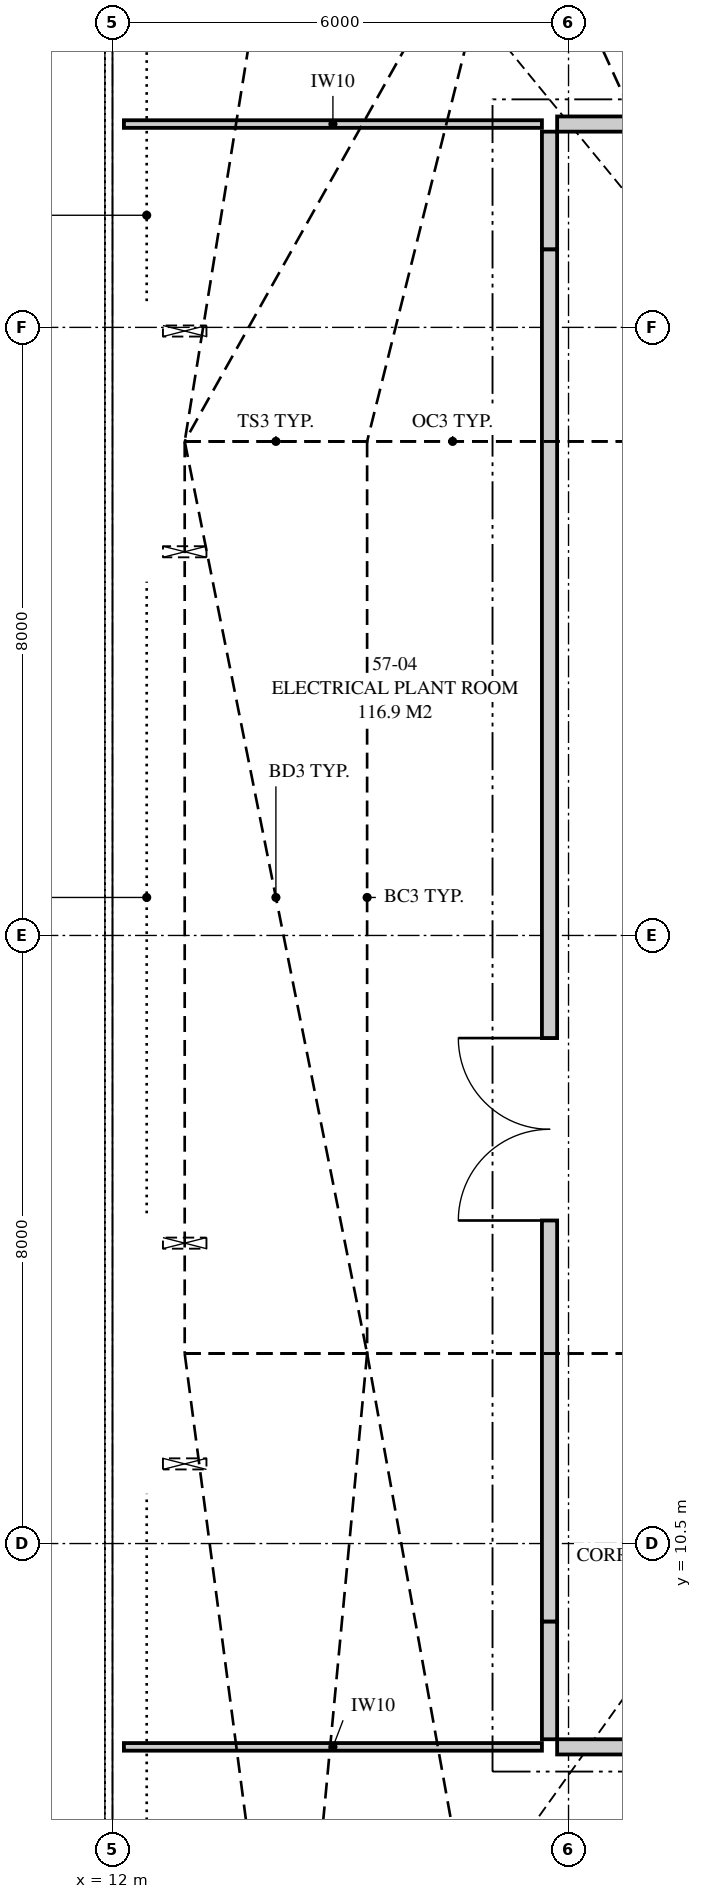
"""IFC4 building model, lengths in metres.
Left out: names, types, materials, properties, quantities, classifications, styles, units other than length and angle.
Written with IfcOpenShell. Run it as: python <this file> out.ifc"""

import sys

from ifc_helpers import new_model, si_unit, direction, frame, frame_2d, origin, place, context, subcontext, project, spatial, polyline, rectangle, outline, extrude, element, fill, save


model = new_model("IFC4")
c1 = context("Model", 3, precision=1e-05, world=origin(), true_north=direction((0.0, 1.0)))
c2 = subcontext(c1, "Body", "Model", "MODEL_VIEW")
j1 = project(units=[si_unit("LENGTHUNIT", "METRE"), si_unit("PLANEANGLEUNIT", "RADIAN")], contexts=[c1])
p1 = place(None, origin())
s1 = spatial("IfcSite", under=j1, at=p1, CompositionType="ELEMENT")
p2 = place(p1, origin())
s2 = spatial("IfcBuilding", under=s1, at=p2, CompositionType="ELEMENT")
p3 = place(p2, frame((0.0, 0.0, 207.95)))
s3 = spatial("IfcBuildingStorey", under=s2, at=p3, CompositionType="ELEMENT", Elevation=207.95)
p4 = place(p3, frame((17.85, 7.825, 0.0), z_axis=(0.0, 0.0, 1.0), x_axis=(1.0, 0.0, 0.0)))
e1 = element("IfcWall", 1, at=p4, inside=s3, PredefinedType="PARTITIONING", context=c2, shape_type="SweptSolid", body=[
    extrude(outline(polyline([(28.1, 1.2), (28.1, 4.72), (24.046, 4.72), (24.046, 4.141), (23.199, 4.141), (23.199, 4.72), (20.797, 4.72), (20.797, 4.141), (19.951, 4.141), (19.951, 4.72), (17.281, 4.72), (17.281, 4.245), (16.769, 4.245), (16.769, 4.72), (15.675, 4.72), (15.675, 4.141), (14.708, 4.141), (14.708, 4.72), (10.886, 4.72), (10.886, 4.141), (10.042, 4.141), (10.042, 4.72), (5.956, 4.72), (5.956, 4.141), (5.037, 4.141), (5.037, 4.72), (3.758, 4.72), (3.758, 4.141), (3.117, 4.141), (3.117, 4.72), (1.606, 4.72), (1.606, 4.141), (1.038, 4.141), (1.038, 4.72), (0.0, 4.72), (0.0, 1.2), (1.102, 1.2), (1.102, 0.0), (27.304, 0.0), (27.304, 1.2), (28.1, 1.2)]), holes=[polyline([(16.179, 3.43), (16.686, 3.496), (16.686, 3.004), (16.632, 2.889), (16.125, 2.824), (16.125, 3.316), (16.179, 3.43)])]), frame((0.0, 0.1, 0.0), z_axis=(0.0, -1.0, 0.0), x_axis=(1.0, 0.0, 0.0)), (0.0, 0.0, 1.0), 0.2),
])
p5 = place(p4, frame((1.325, 0.0, 0.0)))
e2 = element("IfcOpeningElement", 2, at=p5, cuts=e1, PredefinedType="OPENING", context=c2, shape_type="SweptSolid", body=[
    extrude(rectangle(XDim=1.0, YDim=2.1, at=frame_2d((0.5, 1.05))), frame((0.0, 0.11, 0.0), z_axis=(0.0, -1.0, 0.0), x_axis=(1.0, 0.0, 0.0)), (0.0, 0.0, 1.0), 0.22),
])
p6 = place(p4, frame((26.1, 0.0, 0.0)))
e3 = element("IfcOpeningElement", 3, at=p6, cuts=e1, PredefinedType="OPENING", context=c2, shape_type="SweptSolid", body=[
    extrude(rectangle(XDim=1.0, YDim=2.1, at=frame_2d((0.5, 1.05))), frame((0.0, 0.11, 0.0), z_axis=(0.0, -1.0, 0.0), x_axis=(1.0, 0.0, 0.0)), (0.0, 0.0, 1.0), 0.22),
])
p7 = place(p3, frame((17.75, 7.925, 0.0), z_axis=(0.0, 0.0, 1.0), x_axis=(0.0, 1.0, 0.0)))
e4 = element("IfcWall", 4, at=p7, inside=s3, PredefinedType="PARTITIONING", context=c2, shape_type="SweptSolid", body=[
    extrude(outline(polyline([(1.55, 4.72), (0.0, 4.72), (0.0, 1.2), (0.178, 1.2), (0.178, 0.0), (1.55, 0.0), (1.55, 4.72)])), frame((0.0, 0.1, 0.0), z_axis=(0.0, -1.0, 0.0), x_axis=(1.0, 0.0, 0.0)), (0.0, 0.0, 1.0), 0.2),
])
p8 = place(p3, frame((17.85, 29.175, 0.0), z_axis=(0.0, 0.0, 1.0), x_axis=(1.0, 0.0, 0.0)))
e5 = element("IfcWall", 5, at=p8, inside=s3, PredefinedType="PARTITIONING", context=c2, shape_type="SweptSolid", body=[
    extrude(outline(polyline([(28.1, 1.2), (28.1, 4.72), (23.48, 4.72), (23.48, 4.141), (22.49, 4.141), (22.49, 4.72), (21.506, 4.72), (21.506, 4.141), (20.516, 4.141), (20.516, 4.72), (17.281, 4.72), (17.281, 4.245), (16.769, 4.245), (16.769, 4.72), (13.232, 4.72), (13.232, 4.141), (12.437, 4.141), (12.437, 4.72), (11.948, 4.72), (11.948, 4.141), (11.126, 4.141), (11.126, 4.72), (4.143, 4.72), (4.143, 4.141), (2.733, 4.141), (2.733, 4.72), (1.35, 4.72), (1.35, 4.141), (0.74, 4.141), (0.74, 4.72), (0.0, 4.72), (0.0, 1.2), (0.892, 1.2), (0.892, 0.0), (27.554, 0.0), (27.554, 1.2), (28.1, 1.2)]), holes=[polyline([(16.106, 3.278), (16.617, 3.359), (16.617, 2.855), (16.556, 2.728), (16.045, 2.646), (16.045, 3.15), (16.106, 3.278)])]), frame((0.0, 0.1, 0.0), z_axis=(0.0, -1.0, 0.0), x_axis=(1.0, 0.0, 0.0)), (0.0, 0.0, 1.0), 0.2),
])
p9 = place(p8, frame((12.8, 0.0, 0.0)))
e6 = element("IfcOpeningElement", 6, at=p9, cuts=e5, PredefinedType="OPENING", context=c2, shape_type="SweptSolid", body=[
    extrude(rectangle(XDim=2.4, YDim=2.4, at=frame_2d((1.2, 1.2))), frame((0.0, 0.11, 0.0), z_axis=(0.0, -1.0, 0.0), x_axis=(1.0, 0.0, 0.0)), (0.0, 0.0, 1.0), 0.22),
])
p10 = place(p3, frame((17.75, 27.525, 0.0), z_axis=(0.0, 0.0, 1.0), x_axis=(0.0, 1.0, 0.0)))
e7 = element("IfcWall", 7, at=p10, inside=s3, PredefinedType="PARTITIONING", context=c2, shape_type="SweptSolid", body=[
    extrude(outline(polyline([(0.0, 4.72), (0.0, 0.0), (1.061, 0.0), (1.061, 1.2), (1.55, 1.2), (1.55, 4.72), (0.0, 4.72)])), frame((0.0, 0.1, 0.0), z_axis=(0.0, -1.0, 0.0), x_axis=(1.0, 0.0, 0.0)), (0.0, 0.0, 1.0), 0.2),
])
p11 = place(p3, frame((17.75, 9.475, 0.0), z_axis=(0.0, 0.0, 1.0), x_axis=(0.0, 1.0, 0.0)))
e8 = element("IfcWall", 8, at=p11, inside=s3, PredefinedType="PARTITIONING", context=c2, shape_type="SweptSolid", body=[
    extrude(outline(polyline([(18.05, 0.0), (18.05, 4.72), (15.737, 4.72), (15.737, 4.245), (15.313, 4.245), (15.313, 4.72), (3.737, 4.72), (3.737, 4.245), (3.313, 4.245), (3.313, 4.72), (0.0, 4.72), (0.0, 0.0), (18.05, 0.0)]), holes=[polyline([(3.303, 2.515), (3.303, 3.259), (3.747, 3.259), (3.747, 2.515), (3.303, 2.515)]), polyline([(15.303, 2.515), (15.303, 3.259), (15.747, 3.259), (15.747, 2.515), (15.303, 2.515)])]), frame((0.0, 0.1, 0.0), z_axis=(0.0, -1.0, 0.0), x_axis=(1.0, 0.0, 0.0)), (0.0, 0.0, 1.0), 0.2),
])
p12 = place(p11, frame((5.275, 0.0, 0.0)))
e9 = element("IfcOpeningElement", 9, at=p12, cuts=e8, PredefinedType="OPENING", context=c2, shape_type="SweptSolid", body=[
    extrude(rectangle(XDim=2.4, YDim=2.4, at=frame_2d((1.2, 1.2))), frame((0.0, 0.11, 0.0), z_axis=(0.0, -1.0, 0.0), x_axis=(1.0, 0.0, 0.0)), (0.0, 0.0, 1.0), 0.22),
])
p13 = place(p3, frame((12.15, 7.825, 0.0), z_axis=(0.0, 0.0, 1.0), x_axis=(1.0, 0.0, 0.0)))
e10 = element("IfcWall", 10, at=p13, inside=s3, PredefinedType="PARTITIONING", context=c2, shape_type="SweptSolid", body=[
    extrude(outline(polyline([(5.5, 1.2), (5.5, 4.72), (4.647, 4.72), (4.647, 3.72), (3.613, 3.72), (3.613, 4.72), (0.0, 4.72), (0.0, 0.0), (5.465, 0.0), (5.465, 1.2), (5.5, 1.2)]), holes=[polyline([(2.247, 1.24), (2.247, 2.245), (2.258, 2.301), (3.18, 2.341), (3.18, 1.336), (3.169, 1.281), (2.247, 1.24)])]), frame((0.0, 0.05, 0.0), z_axis=(0.0, -1.0, 0.0), x_axis=(1.0, 0.0, 0.0)), (0.0, 0.0, 1.0), 0.1),
])
p14 = place(p3, frame((12.15, 29.175, 0.0), z_axis=(0.0, 0.0, 1.0), x_axis=(1.0, 0.0, 0.0)))
e11 = element("IfcWall", 11, at=p14, inside=s3, PredefinedType="PARTITIONING", context=c2, shape_type="SweptSolid", body=[
    extrude(outline(polyline([(5.5, 1.2), (5.5, 4.72), (4.77, 4.72), (4.77, 3.72), (3.714, 3.72), (3.714, 4.72), (0.0, 4.72), (0.0, 0.0), (5.177, 0.0), (5.177, 1.2), (5.5, 1.2)]), holes=[polyline([(2.586, 1.219), (2.586, 2.269), (2.646, 2.339), (3.694, 2.628), (3.694, 1.578), (3.633, 1.508), (2.586, 1.219)])]), frame((0.0, 0.05, 0.0), z_axis=(0.0, -1.0, 0.0), x_axis=(1.0, 0.0, 0.0)), (0.0, 0.0, 1.0), 0.1),
])
p15 = place(p12, origin())
e12 = element("IfcDoor", 12, at=p15, inside=s3, OperationType="DOUBLE_DOOR_SINGLE_SWING", PredefinedType="DOOR", context=c2, shape_type="SweptSolid", body=[
    extrude(rectangle(XDim=2.4, YDim=2.4, at=frame_2d((1.2, 1.2))), frame((0.0, 0.025, 0.0), z_axis=(0.0, -1.0, 0.0), x_axis=(1.0, 0.0, 0.0)), (0.0, 0.0, 1.0), 0.05),
])
fill(e9, e12)
save(model, sys.argv[1])
